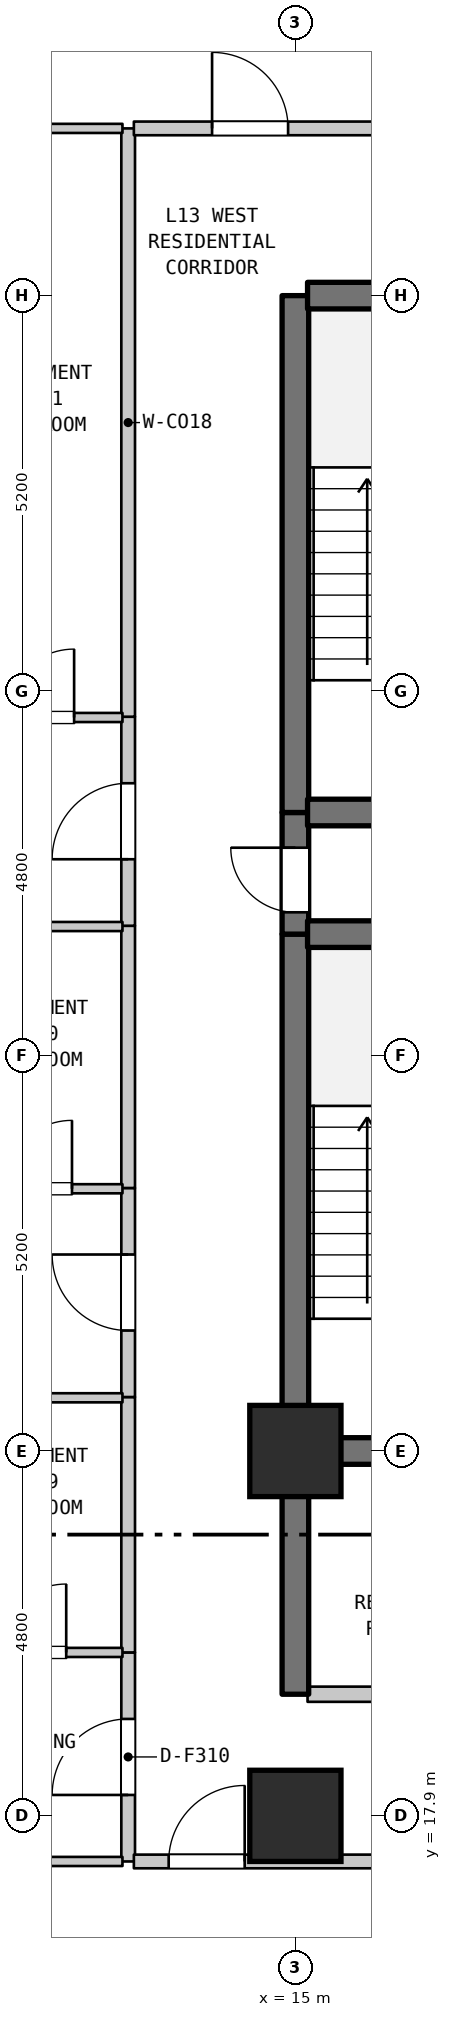
"""IFC4 building model, lengths in metres.
Left out: names, types, materials, properties, quantities, classifications, styles, units other than length and angle.
Written with IfcOpenShell. Run it as: python <this file> out.ifc"""

import sys

from ifc_helpers import new_model, si_unit, direction, frame, frame_2d, origin, origin_2d, place, context, subcontext, project, spatial, rectangle, extrude, element, fill, save


model = new_model("IFC4")
c1 = context("Model", 3, precision=1e-05, world=origin(), true_north=direction((0.0, 1.0)))
c2 = subcontext(c1, "Body", "Model", "MODEL_VIEW")
j1 = project(units=[si_unit("LENGTHUNIT", "METRE"), si_unit("PLANEANGLEUNIT", "RADIAN")], contexts=[c1])
p1 = place(None, origin())
s1 = spatial("IfcSite", under=j1, at=p1, CompositionType="ELEMENT")
p2 = place(p1, origin())
s2 = spatial("IfcBuilding", under=s1, at=p2, CompositionType="ELEMENT")
p3 = place(p2, frame((0.0, 0.0, 57.3)))
s3 = spatial("IfcBuildingStorey", under=s2, at=p3, CompositionType="ELEMENT", Elevation=57.3)
for number, where, z_axis, x_axis in (
    (1, (15.0, 17.9, 0.0), (0.0, 0.0, 1.0), (1.0, 0.0, 0.0)),
    (2, (15.0, 22.7, 0.0), (0.0, 0.0, 1.0), (1.0, 0.0, 0.0)),
):
    element("IfcColumn", number, at=place(p3, frame(where, z_axis=z_axis, x_axis=x_axis)), inside=s3, PredefinedType="COLUMN", context=c2, shape_type="SweptSolid", body=[
        extrude(rectangle(XDim=1.2, YDim=1.2, at=origin_2d()), origin(), (0.0, 0.0, 1.0), 3.7),
    ])
p4 = place(p3, frame((12.8, 17.3, 0.0), z_axis=(0.0, 0.0, 1.0), x_axis=(0.0, 1.0, 0.0)))
e3 = element("IfcWall", 3, at=p4, inside=s3, PredefinedType="STANDARD", context=c2, shape_type="SweptSolid", body=[
    extrude(rectangle(XDim=2.75, YDim=0.18, at=frame_2d((1.375, 0.0))), origin(), (0.0, 0.0, 1.0), 3.28),
])
p5 = place(p4, frame((0.875, 0.0, 0.0)))
e4 = element("IfcOpeningElement", 4, at=p5, cuts=e3, PredefinedType="OPENING", context=c2, shape_type="SweptSolid", body=[
    extrude(rectangle(XDim=1.0, YDim=2.15, at=frame_2d((0.5, 1.075))), frame((0.0, 0.1, 0.0), z_axis=(0.0, -1.0, 0.0), x_axis=(1.0, 0.0, 0.0)), (0.0, 0.0, 1.0), 0.2),
])
p6 = place(p3, frame((12.8, 20.05, 0.0), z_axis=(0.0, 0.0, 1.0), x_axis=(0.0, 1.0, 0.0)))
e5 = element("IfcWall", 5, at=p6, inside=s3, PredefinedType="STANDARD", context=c2, shape_type="SweptSolid", body=[
    extrude(rectangle(XDim=3.36, YDim=0.18, at=frame_2d((1.68, 0.0))), origin(), (0.0, 0.0, 1.0), 3.28),
])
p7 = place(p3, frame((12.8, 23.41, 0.0), z_axis=(0.0, 0.0, 1.0), x_axis=(0.0, 1.0, 0.0)))
e6 = element("IfcWall", 6, at=p7, inside=s3, PredefinedType="STANDARD", context=c2, shape_type="SweptSolid", body=[
    extrude(rectangle(XDim=2.75, YDim=0.18, at=frame_2d((1.375, 0.0))), origin(), (0.0, 0.0, 1.0), 3.28),
])
p8 = place(p7, frame((0.875, 0.0, 0.0)))
e7 = element("IfcOpeningElement", 7, at=p8, cuts=e6, PredefinedType="OPENING", context=c2, shape_type="SweptSolid", body=[
    extrude(rectangle(XDim=1.0, YDim=2.15, at=frame_2d((0.5, 1.075))), frame((0.0, 0.1, 0.0), z_axis=(0.0, -1.0, 0.0), x_axis=(1.0, 0.0, 0.0)), (0.0, 0.0, 1.0), 0.2),
])
p9 = place(p3, frame((12.8, 26.16, 0.0), z_axis=(0.0, 0.0, 1.0), x_axis=(0.0, 1.0, 0.0)))
e8 = element("IfcWall", 8, at=p9, inside=s3, PredefinedType="STANDARD", context=c2, shape_type="SweptSolid", body=[
    extrude(rectangle(XDim=3.45, YDim=0.18, at=frame_2d((1.725, 0.0))), origin(), (0.0, 0.0, 1.0), 3.28),
])
p10 = place(p3, frame((12.8, 29.61, 0.0), z_axis=(0.0, 0.0, 1.0), x_axis=(0.0, 1.0, 0.0)))
e9 = element("IfcWall", 9, at=p10, inside=s3, PredefinedType="STANDARD", context=c2, shape_type="SweptSolid", body=[
    extrude(rectangle(XDim=2.75, YDim=0.18, at=frame_2d((1.375, 0.0))), origin(), (0.0, 0.0, 1.0), 3.28),
])
p11 = place(p10, frame((0.875, 0.0, 0.0)))
e10 = element("IfcOpeningElement", 10, at=p11, cuts=e9, PredefinedType="OPENING", context=c2, shape_type="SweptSolid", body=[
    extrude(rectangle(XDim=1.0, YDim=2.15, at=frame_2d((0.5, 1.075))), frame((0.0, 0.1, 0.0), z_axis=(0.0, -1.0, 0.0), x_axis=(1.0, 0.0, 0.0)), (0.0, 0.0, 1.0), 0.2),
])
p12 = place(p3, frame((12.8, 32.36, 0.0), z_axis=(0.0, 0.0, 1.0), x_axis=(0.0, 1.0, 0.0)))
e11 = element("IfcWall", 11, at=p12, inside=s3, PredefinedType="STANDARD", context=c2, shape_type="SweptSolid", body=[
    extrude(rectangle(XDim=7.74, YDim=0.18, at=frame_2d((3.87, 0.0))), origin(), (0.0, 0.0, 1.0), 3.28),
])
p13 = place(p3, frame((15.0, 19.5, 0.0), z_axis=(0.0, 0.0, 1.0), x_axis=(0.0, 1.0, 0.0)))
e12 = element("IfcWall", 12, at=p13, inside=s3, PredefinedType="SHEAR", context=c2, shape_type="SweptSolid", body=[
    extrude(rectangle(XDim=3.2, YDim=0.35, at=frame_2d((1.6, 0.0))), origin(), (0.0, 0.0, 1.0), 3.28),
])
p14 = place(p3, frame((15.0, 22.7, 0.0), z_axis=(0.0, 0.0, 1.0), x_axis=(0.0, 1.0, 0.0)))
e13 = element("IfcWall", 13, at=p14, inside=s3, PredefinedType="SHEAR", context=c2, shape_type="SweptSolid", body=[
    extrude(rectangle(XDim=6.8, YDim=0.35, at=frame_2d((3.4, 0.0))), origin(), (0.0, 0.0, 1.0), 3.28),
])
p15 = place(p3, frame((15.0, 29.5, 0.0), z_axis=(0.0, 0.0, 1.0), x_axis=(0.0, 1.0, 0.0)))
e14 = element("IfcWall", 14, at=p15, inside=s3, PredefinedType="SHEAR", context=c2, shape_type="SweptSolid", body=[
    extrude(rectangle(XDim=1.6, YDim=0.35, at=frame_2d((0.8, 0.0))), origin(), (0.0, 0.0, 1.0), 3.28),
])
p16 = place(p15, frame((0.287, 0.0, 0.0)))
e15 = element("IfcOpeningElement", 15, at=p16, cuts=e14, PredefinedType="OPENING", context=c2, shape_type="SweptSolid", body=[
    extrude(rectangle(XDim=0.85, YDim=2.1, at=frame_2d((0.425, 1.05))), frame((0.0, 0.185, 0.0), z_axis=(0.0, -1.0, 0.0), x_axis=(1.0, 0.0, 0.0)), (0.0, 0.0, 1.0), 0.37),
])
p17 = place(p3, frame((15.0, 31.1, 0.0), z_axis=(0.0, 0.0, 1.0), x_axis=(0.0, 1.0, 0.0)))
e16 = element("IfcWall", 16, at=p17, inside=s3, PredefinedType="SHEAR", context=c2, shape_type="SweptSolid", body=[
    extrude(rectangle(XDim=6.8, YDim=0.35, at=frame_2d((3.4, 0.0))), origin(), (0.0, 0.0, 1.0), 3.28),
])
p18 = place(p3, frame((9.085, 17.3, 0.0), z_axis=(0.0, 0.0, 1.0), x_axis=(1.0, 0.0, 0.0)))
e17 = element("IfcWall", 17, at=p18, inside=s3, PredefinedType="PARTITIONING", context=c2, shape_type="SweptSolid", body=[
    extrude(rectangle(XDim=3.64, YDim=0.12, at=frame_2d((1.82, 0.0))), origin(), (0.0, 0.0, 1.0), 3.28),
])
p19 = place(p3, frame((12.875, 17.3, 0.0), z_axis=(0.0, 0.0, 1.0), x_axis=(1.0, 0.0, 0.0)))
e18 = element("IfcWall", 18, at=p19, inside=s3, PredefinedType="STANDARD", context=c2, shape_type="SweptSolid", body=[
    extrude(rectangle(XDim=3.78, YDim=0.18, at=frame_2d((1.89, 0.0))), origin(), (0.0, 0.0, 1.0), 3.28),
])
p20 = place(p19, frame((0.458, 0.0, 0.0)))
e19 = element("IfcOpeningElement", 19, at=p20, cuts=e18, PredefinedType="OPENING", context=c2, shape_type="SweptSolid", body=[
    extrude(rectangle(XDim=1.0, YDim=2.15, at=frame_2d((0.5, 1.075))), frame((0.0, 0.1, 0.0), z_axis=(0.0, -1.0, 0.0), x_axis=(1.0, 0.0, 0.0)), (0.0, 0.0, 1.0), 0.2),
])
p21 = place(p3, frame((15.16, 19.5, 0.0), z_axis=(0.0, 0.0, 1.0), x_axis=(1.0, 0.0, 0.0)))
e20 = element("IfcWall", 20, at=p21, inside=s3, PredefinedType="STANDARD", context=c2, shape_type="SweptSolid", body=[
    extrude(rectangle(XDim=3.68, YDim=0.2, at=frame_2d((1.84, 0.0))), origin(), (0.0, 0.0, 1.0), 3.28),
])
p22 = place(p21, frame((1.39, 0.0, 0.0)))
e21 = element("IfcOpeningElement", 21, at=p22, cuts=e20, PredefinedType="OPENING", context=c2, shape_type="SweptSolid", body=[
    extrude(rectangle(XDim=0.9, YDim=2.15, at=frame_2d((0.45, 1.075))), frame((0.0, 0.11, 0.0), z_axis=(0.0, -1.0, 0.0), x_axis=(1.0, 0.0, 0.0)), (0.0, 0.0, 1.0), 0.22),
])
p23 = place(p3, frame((10.456, 20.05, 0.0), z_axis=(0.0, 0.0, 1.0), x_axis=(1.0, 0.0, 0.0)))
e22 = element("IfcWall", 22, at=p23, inside=s3, PredefinedType="PARTITIONING", context=c2, shape_type="SweptSolid", body=[
    extrude(rectangle(XDim=2.269, YDim=0.12, at=frame_2d((1.135, 0.0))), origin(), (0.0, 0.0, 1.0), 3.28),
])
p24 = place(p23, frame((0.629, 0.0, 0.0)))
e23 = element("IfcOpeningElement", 23, at=p24, cuts=e22, PredefinedType="OPENING", context=c2, shape_type="SweptSolid", body=[
    extrude(rectangle(XDim=0.9, YDim=2.1, at=frame_2d((0.45, 1.05))), frame((0.0, 0.07, 0.0), z_axis=(0.0, -1.0, 0.0), x_axis=(1.0, 0.0, 0.0)), (0.0, 0.0, 1.0), 0.14),
])
p25 = place(p3, frame((15.16, 22.7, 0.0), z_axis=(0.0, 0.0, 1.0), x_axis=(1.0, 0.0, 0.0)))
e24 = element("IfcWall", 24, at=p25, inside=s3, PredefinedType="SHEAR", context=c2, shape_type="SweptSolid", body=[
    extrude(rectangle(XDim=3.68, YDim=0.35, at=frame_2d((1.84, 0.0))), origin(), (0.0, 0.0, 1.0), 3.28),
])
p26 = place(p3, frame((10.456, 23.4, 0.0), z_axis=(0.0, 0.0, 1.0), x_axis=(1.0, 0.0, 0.0)))
e25 = element("IfcWall", 25, at=p26, inside=s3, PredefinedType="PARTITIONING", context=c2, shape_type="SweptSolid", body=[
    extrude(rectangle(XDim=2.269, YDim=0.12, at=frame_2d((1.135, 0.0))), origin(), (0.0, 0.0, 1.0), 3.28),
])
p27 = place(p3, frame((10.466, 26.15, 0.0), z_axis=(0.0, 0.0, 1.0), x_axis=(1.0, 0.0, 0.0)))
e26 = element("IfcWall", 26, at=p27, inside=s3, PredefinedType="PARTITIONING", context=c2, shape_type="SweptSolid", body=[
    extrude(rectangle(XDim=2.259, YDim=0.12, at=frame_2d((1.129, 0.0))), origin(), (0.0, 0.0, 1.0), 3.28),
])
p28 = place(p27, frame((0.695, 0.0, 0.0)))
e27 = element("IfcOpeningElement", 27, at=p28, cuts=e26, PredefinedType="OPENING", context=c2, shape_type="SweptSolid", body=[
    extrude(rectangle(XDim=0.9, YDim=2.1, at=frame_2d((0.45, 1.05))), frame((0.0, 0.07, 0.0), z_axis=(0.0, -1.0, 0.0), x_axis=(1.0, 0.0, 0.0)), (0.0, 0.0, 1.0), 0.14),
])
p29 = place(p3, frame((15.16, 29.5, 0.0), z_axis=(0.0, 0.0, 1.0), x_axis=(1.0, 0.0, 0.0)))
e28 = element("IfcWall", 28, at=p29, inside=s3, PredefinedType="SHEAR", context=c2, shape_type="SweptSolid", body=[
    extrude(rectangle(XDim=3.68, YDim=0.35, at=frame_2d((1.84, 0.0))), origin(), (0.0, 0.0, 1.0), 3.28),
])
p30 = place(p3, frame((10.466, 29.6, 0.0), z_axis=(0.0, 0.0, 1.0), x_axis=(1.0, 0.0, 0.0)))
e29 = element("IfcWall", 29, at=p30, inside=s3, PredefinedType="PARTITIONING", context=c2, shape_type="SweptSolid", body=[
    extrude(rectangle(XDim=2.259, YDim=0.12, at=frame_2d((1.129, 0.0))), origin(), (0.0, 0.0, 1.0), 3.28),
])
p31 = place(p3, frame((15.16, 31.1, 0.0), z_axis=(0.0, 0.0, 1.0), x_axis=(1.0, 0.0, 0.0)))
e30 = element("IfcWall", 30, at=p31, inside=s3, PredefinedType="SHEAR", context=c2, shape_type="SweptSolid", body=[
    extrude(rectangle(XDim=3.68, YDim=0.35, at=frame_2d((1.84, 0.0))), origin(), (0.0, 0.0, 1.0), 3.28),
])
p32 = place(p3, frame((10.523, 32.35, 0.0), z_axis=(0.0, 0.0, 1.0), x_axis=(1.0, 0.0, 0.0)))
e31 = element("IfcWall", 31, at=p32, inside=s3, PredefinedType="PARTITIONING", context=c2, shape_type="SweptSolid", body=[
    extrude(rectangle(XDim=2.202, YDim=0.12, at=frame_2d((1.101, 0.0))), origin(), (0.0, 0.0, 1.0), 3.28),
])
p33 = place(p32, frame((0.666, 0.0, 0.0)))
e32 = element("IfcOpeningElement", 32, at=p33, cuts=e31, PredefinedType="OPENING", context=c2, shape_type="SweptSolid", body=[
    extrude(rectangle(XDim=0.9, YDim=2.1, at=frame_2d((0.45, 1.05))), frame((0.0, 0.07, 0.0), z_axis=(0.0, -1.0, 0.0), x_axis=(1.0, 0.0, 0.0)), (0.0, 0.0, 1.0), 0.14),
])
p34 = place(p3, frame((15.16, 37.9, 0.0), z_axis=(0.0, 0.0, 1.0), x_axis=(1.0, 0.0, 0.0)))
e33 = element("IfcWall", 33, at=p34, inside=s3, PredefinedType="SHEAR", context=c2, shape_type="SweptSolid", body=[
    extrude(rectangle(XDim=3.68, YDim=0.35, at=frame_2d((1.84, 0.0))), origin(), (0.0, 0.0, 1.0), 3.28),
])
p35 = place(p3, frame((10.523, 40.1, 0.0), z_axis=(0.0, 0.0, 1.0), x_axis=(1.0, 0.0, 0.0)))
e34 = element("IfcWall", 34, at=p35, inside=s3, PredefinedType="PARTITIONING", context=c2, shape_type="SweptSolid", body=[
    extrude(rectangle(XDim=2.202, YDim=0.12, at=frame_2d((1.101, 0.0))), origin(), (0.0, 0.0, 1.0), 3.28),
])
p36 = place(p3, frame((12.875, 40.1, 0.0), z_axis=(0.0, 0.0, 1.0), x_axis=(1.0, 0.0, 0.0)))
e35 = element("IfcWall", 35, at=p36, inside=s3, PredefinedType="STANDARD", context=c2, shape_type="SweptSolid", body=[
    extrude(rectangle(XDim=3.23, YDim=0.18, at=frame_2d((1.615, 0.0))), origin(), (0.0, 0.0, 1.0), 3.28),
])
p37 = place(p36, frame((1.029, 0.0, 0.0)))
e36 = element("IfcOpeningElement", 36, at=p37, cuts=e35, PredefinedType="OPENING", context=c2, shape_type="SweptSolid", body=[
    extrude(rectangle(XDim=1.0, YDim=2.15, at=frame_2d((0.5, 1.075))), frame((0.0, 0.1, 0.0), z_axis=(0.0, -1.0, 0.0), x_axis=(1.0, 0.0, 0.0)), (0.0, 0.0, 1.0), 0.2),
])
p38 = place(p5, origin())
e37 = element("IfcDoor", 37, at=p38, inside=s3, OperationType="SINGLE_SWING_LEFT", PredefinedType="DOOR", context=c2, shape_type="SweptSolid", body=[
    extrude(rectangle(XDim=1.0, YDim=2.15, at=frame_2d((0.5, 1.075))), frame((0.0, 0.025, 0.0), z_axis=(0.0, -1.0, 0.0), x_axis=(1.0, 0.0, 0.0)), (0.0, 0.0, 1.0), 0.05),
])
fill(e4, e37)
p39 = place(p8, origin())
e38 = element("IfcDoor", 38, at=p39, inside=s3, OperationType="SINGLE_SWING_RIGHT", PredefinedType="DOOR", context=c2, shape_type="SweptSolid", body=[
    extrude(rectangle(XDim=1.0, YDim=2.15, at=frame_2d((0.5, 1.075))), frame((0.0, 0.025, 0.0), z_axis=(0.0, -1.0, 0.0), x_axis=(1.0, 0.0, 0.0)), (0.0, 0.0, 1.0), 0.05),
])
fill(e7, e38)
p40 = place(p11, origin())
e39 = element("IfcDoor", 39, at=p40, inside=s3, OperationType="SINGLE_SWING_LEFT", PredefinedType="DOOR", context=c2, shape_type="SweptSolid", body=[
    extrude(rectangle(XDim=1.0, YDim=2.15, at=frame_2d((0.5, 1.075))), frame((0.0, 0.025, 0.0), z_axis=(0.0, -1.0, 0.0), x_axis=(1.0, 0.0, 0.0)), (0.0, 0.0, 1.0), 0.05),
])
fill(e10, e39)
p41 = place(p16, origin())
e40 = element("IfcDoor", 40, at=p41, inside=s3, OperationType="SINGLE_SWING_RIGHT", PredefinedType="DOOR", context=c2, shape_type="SweptSolid", body=[
    extrude(rectangle(XDim=0.85, YDim=2.1, at=frame_2d((0.425, 1.05))), frame((0.0, 0.025, 0.0), z_axis=(0.0, -1.0, 0.0), x_axis=(1.0, 0.0, 0.0)), (0.0, 0.0, 1.0), 0.05),
])
fill(e15, e40)
p42 = place(p20, origin())
e41 = element("IfcDoor", 41, at=p42, inside=s3, OperationType="SINGLE_SWING_RIGHT", PredefinedType="DOOR", context=c2, shape_type="SweptSolid", body=[
    extrude(rectangle(XDim=1.0, YDim=2.15, at=frame_2d((0.5, 1.075))), frame((0.0, 0.025, 0.0), z_axis=(0.0, -1.0, 0.0), x_axis=(1.0, 0.0, 0.0)), (0.0, 0.0, 1.0), 0.05),
])
fill(e19, e41)
p43 = place(p24, origin())
e42 = element("IfcDoor", 42, at=p43, inside=s3, OperationType="SINGLE_SWING_RIGHT", PredefinedType="DOOR", context=c2, shape_type="SweptSolid", body=[
    extrude(rectangle(XDim=0.9, YDim=2.1, at=frame_2d((0.45, 1.05))), frame((0.0, 0.025, 0.0), z_axis=(0.0, -1.0, 0.0), x_axis=(1.0, 0.0, 0.0)), (0.0, 0.0, 1.0), 0.05),
])
fill(e23, e42)
p44 = place(p28, origin())
e43 = element("IfcDoor", 43, at=p44, inside=s3, OperationType="SINGLE_SWING_RIGHT", PredefinedType="DOOR", context=c2, shape_type="SweptSolid", body=[
    extrude(rectangle(XDim=0.9, YDim=2.1, at=frame_2d((0.45, 1.05))), frame((0.0, 0.025, 0.0), z_axis=(0.0, -1.0, 0.0), x_axis=(1.0, 0.0, 0.0)), (0.0, 0.0, 1.0), 0.05),
])
fill(e27, e43)
p45 = place(p33, origin())
e44 = element("IfcDoor", 44, at=p45, inside=s3, OperationType="SINGLE_SWING_RIGHT", PredefinedType="DOOR", context=c2, shape_type="SweptSolid", body=[
    extrude(rectangle(XDim=0.9, YDim=2.1, at=frame_2d((0.45, 1.05))), frame((0.0, 0.025, 0.0), z_axis=(0.0, -1.0, 0.0), x_axis=(1.0, 0.0, 0.0)), (0.0, 0.0, 1.0), 0.05),
])
fill(e32, e44)
p46 = place(p37, origin())
e45 = element("IfcDoor", 45, at=p46, inside=s3, OperationType="SINGLE_SWING_LEFT", PredefinedType="DOOR", context=c2, shape_type="SweptSolid", body=[
    extrude(rectangle(XDim=1.0, YDim=2.15, at=frame_2d((0.5, 1.075))), frame((0.0, 0.025, 0.0), z_axis=(0.0, -1.0, 0.0), x_axis=(1.0, 0.0, 0.0)), (0.0, 0.0, 1.0), 0.05),
])
fill(e36, e45)
save(model, sys.argv[1])
